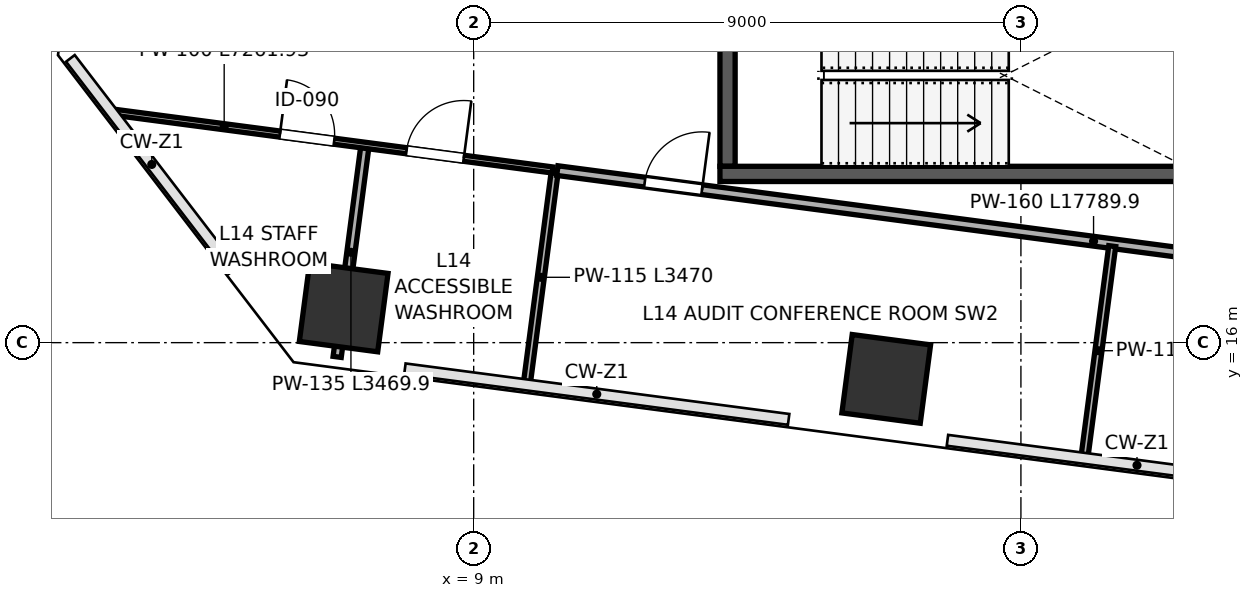
"""IFC4 building model, lengths in metres.
Left out: names, types, materials, properties, quantities, classifications, styles, units other than length and angle.
Written with IfcOpenShell. Run it as: python <this file> out.ifc"""

import sys

from ifc_helpers import new_model, si_unit, direction, frame, frame_2d, origin, origin_2d, place, context, subcontext, project, spatial, rectangle, extrude, clip, halfspace, source, transform, mapped, element, fill, save


model = new_model("IFC4")
c1 = context("Model", 3, precision=1e-05, world=origin(), true_north=direction((0.0, 1.0)))
c2 = subcontext(c1, "Body", "Model", "MODEL_VIEW")
j1 = project(units=[si_unit("LENGTHUNIT", "METRE"), si_unit("PLANEANGLEUNIT", "RADIAN")], contexts=[c1])
p1 = place(None, origin())
s1 = spatial("IfcSite", under=j1, at=p1, CompositionType="ELEMENT")
p2 = place(p1, origin())
s2 = spatial("IfcBuilding", under=s1, at=p2, CompositionType="ELEMENT")
p3 = place(p2, frame((0.0, 0.0, 66.4)))
s3 = spatial("IfcBuildingStorey", under=s2, at=p3, CompositionType="ELEMENT", Elevation=66.4)
p4 = place(p3, frame((6.862, 16.579, 0.0), z_axis=(-0.078747233603, 0.076436236285, 0.993959946367), x_axis=(0.783634981143, 0.621056380729, 0.014324394768)))
e1 = element("IfcColumn", 1, at=p4, inside=s3, PredefinedType="COLUMN", context=c2, shape_type="Clipping", body=[
    clip(clip(extrude(rectangle(XDim=1.3, YDim=1.3, at=origin_2d()), origin(), (0.0, 0.0, 1.0), 4.226), halfspace(frame((0.0, 0.0, 0.081), z_axis=(0.0, 0.0, -1.0), x_axis=(1.0, 0.0, 0.0)), False)), halfspace(frame((0.0, 0.0, 4.145), z_axis=(0.0, 0.0, 1.0), x_axis=(1.0, 0.0, 0.0)), False)),
])
p5 = place(p3, frame((15.785, 15.404, 0.0), z_axis=(-0.085497665031, 0.030505937354, 0.995871245222), x_axis=(0.455606220414, 0.890102566246, 0.011848775584)))
e2 = element("IfcColumn", 2, at=p5, inside=s3, PredefinedType="COLUMN", context=c2, shape_type="Clipping", body=[
    clip(clip(extrude(rectangle(XDim=1.3, YDim=1.3, at=origin_2d()), origin(), (0.0, 0.0, 1.0), 4.218), halfspace(frame((0.0, 0.0, 0.067), z_axis=(0.0, 0.0, -1.0), x_axis=(1.0, 0.0, 0.0)), False)), halfspace(frame((0.0, 0.0, 4.15), z_axis=(0.0, 0.0, 1.0), x_axis=(1.0, 0.0, 0.0)), False)),
])
p6 = place(p3, frame((13.175, 18.9, 0.0), z_axis=(0.0, 0.0, 1.0), x_axis=(0.0, 1.0, 0.0)))
e3 = element("IfcWall", 3, at=p6, inside=s3, PredefinedType="SHEAR", context=c2, shape_type="SweptSolid", body=[
    extrude(rectangle(XDim=2.99, YDim=0.25, at=frame_2d((1.495, 0.0))), origin(), (0.0, 0.0, 1.0), 3.96),
])
p7 = place(p3, frame((13.05, 18.775, 0.0), z_axis=(0.0, 0.0, 1.0), x_axis=(1.0, 0.0, 0.0)))
e4 = element("IfcWall", 4, at=p7, inside=s3, PredefinedType="SHEAR", context=c2, shape_type="SweptSolid", body=[
    extrude(rectangle(XDim=7.9, YDim=0.25, at=frame_2d((3.95, 0.0))), origin(), (0.0, 0.0, 1.0), 3.96),
])
p8 = place(p3, frame((6.755, 15.766, 0.0), z_axis=(0.0, 0.0, 1.0), x_axis=(0.130518214887, 0.991445911577, 0.0)))
e5 = element("IfcWall", 5, at=p8, inside=s3, PredefinedType="PARTITIONING", context=c2, shape_type="SweptSolid", body=[
    extrude(rectangle(XDim=3.47, YDim=0.135, at=frame_2d((1.735, 0.0))), origin(), (0.0, 0.0, 1.0), 3.095),
])
p9 = place(p3, frame((9.878, 15.354, 0.0), z_axis=(0.0, 0.0, 1.0), x_axis=(0.130509110781, 0.991447110038, 0.0)))
e6 = element("IfcWall", 6, at=p9, inside=s3, PredefinedType="PARTITIONING", context=c2, shape_type="SweptSolid", body=[
    extrude(rectangle(XDim=3.47, YDim=0.115, at=frame_2d((1.735, 0.0))), origin(), (0.0, 0.0, 1.0), 3.095),
])
p10 = place(p3, frame((3.097, 19.788, 0.0), z_axis=(0.0, 0.0, 1.0), x_axis=(0.99144674145, -0.130511910828, 0.0)))
e7 = element("IfcWall", 7, at=p10, inside=s3, PredefinedType="PARTITIONING", context=c2, shape_type="SweptSolid", body=[
    extrude(rectangle(XDim=7.262, YDim=0.1, at=frame_2d((3.631, 0.0))), origin(), (0.0, 0.0, 1.0), 3.96),
])
p11 = place(p10, frame((2.74, 0.0, 0.0)))
e8 = element("IfcOpeningElement", 8, at=p11, cuts=e7, PredefinedType="OPENING", context=c2, shape_type="SweptSolid", body=[
    extrude(rectangle(XDim=0.9, YDim=2.15, at=frame_2d((0.45, 1.075))), frame((0.0, 0.06, 0.0), z_axis=(0.0, -1.0, 0.0), x_axis=(1.0, 0.0, 0.0)), (0.0, 0.0, 1.0), 0.12),
])
p12 = place(p10, frame((4.84, 0.0, 0.0)))
e9 = element("IfcOpeningElement", 9, at=p12, cuts=e7, PredefinedType="OPENING", context=c2, shape_type="SweptSolid", body=[
    extrude(rectangle(XDim=0.95, YDim=2.15, at=frame_2d((0.475, 1.075))), frame((0.0, 0.06, 0.0), z_axis=(0.0, -1.0, 0.0), x_axis=(1.0, 0.0, 0.0)), (0.0, 0.0, 1.0), 0.12),
])
p13 = place(p3, frame((10.376, 18.829, 0.0), z_axis=(0.0, 0.0, 1.0), x_axis=(0.99144504436, -0.130524802294, 0.0)))
e10 = element("IfcWall", 10, at=p13, inside=s3, PredefinedType="PARTITIONING", context=c2, shape_type="SweptSolid", body=[
    extrude(rectangle(XDim=17.79, YDim=0.16, at=frame_2d((8.895, 0.0))), origin(), (0.0, 0.0, 1.0), 3.96),
])
p14 = place(p13, frame((1.45, 0.0, 0.0)))
e11 = element("IfcOpeningElement", 11, at=p14, cuts=e10, PredefinedType="OPENING", context=c2, shape_type="SweptSolid", body=[
    extrude(rectangle(XDim=0.95, YDim=2.15, at=frame_2d((0.475, 1.075))), frame((0.0, 0.09, 0.0), z_axis=(0.0, -1.0, 0.0), x_axis=(1.0, 0.0, 0.0)), (0.0, 0.0, 1.0), 0.18),
])
p15 = place(p13, frame((10.5, 0.0, 0.0)))
e12 = element("IfcOpeningElement", 12, at=p15, cuts=e10, PredefinedType="OPENING", context=c2, shape_type="SweptSolid", body=[
    extrude(rectangle(XDim=0.95, YDim=2.15, at=frame_2d((0.475, 1.075))), frame((0.0, 0.09, 0.0), z_axis=(0.0, -1.0, 0.0), x_axis=(1.0, 0.0, 0.0)), (0.0, 0.0, 1.0), 0.18),
])
p16 = place(p3, frame((19.049, 14.147, 0.0), z_axis=(0.0, 0.0, 1.0), x_axis=(0.130518214887, 0.991445911577, 0.0)))
e13 = element("IfcWall", 13, at=p16, inside=s3, PredefinedType="PARTITIONING", context=c2, shape_type="SweptSolid", body=[
    extrude(rectangle(XDim=3.47, YDim=0.115, at=frame_2d((1.735, 0.0))), origin(), (0.0, 0.0, 1.0), 3.095),
])
m1 = source(origin(), c2, "Body", "SweptSolid", [
    extrude(rectangle(XDim=0.9, YDim=2.15, at=frame_2d((0.45, 1.075))), frame((0.0, 0.025, 0.0), z_axis=(0.0, -1.0, 0.0), x_axis=(1.0, 0.0, 0.0)), (0.0, 0.0, 1.0), 0.05),
])
p17 = place(p11, origin())
e14 = element("IfcDoor", 14, at=p17, inside=s3, OperationType="SINGLE_SWING_LEFT", PredefinedType="DOOR", context=c2, shape_type="MappedRepresentation", body=[
    mapped(m1, transform((0.0, 0.0, 0.0), scale=1.0)),
])
fill(e8, e14)
m2 = source(origin(), c2, "Body", "SweptSolid", [
    extrude(rectangle(XDim=0.95, YDim=2.15, at=frame_2d((0.475, 1.075))), frame((0.0, 0.025, 0.0), z_axis=(0.0, -1.0, 0.0), x_axis=(1.0, 0.0, 0.0)), (0.0, 0.0, 1.0), 0.05),
])
p18 = place(p12, origin())
e15 = element("IfcDoor", 15, at=p18, inside=s3, OperationType="SINGLE_SWING_RIGHT", PredefinedType="DOOR", context=c2, shape_type="MappedRepresentation", body=[
    mapped(m2, transform((0.0, 0.0, 0.0), scale=1.0)),
])
fill(e9, e15)
m3 = source(origin(), c2, "Body", "SweptSolid", [
    extrude(rectangle(XDim=0.95, YDim=2.15, at=frame_2d((0.475, 1.075))), frame((0.0, 0.025, 0.0), z_axis=(0.0, -1.0, 0.0), x_axis=(1.0, 0.0, 0.0)), (0.0, 0.0, 1.0), 0.05),
])
p19 = place(p14, origin())
e16 = element("IfcDoor", 16, at=p19, inside=s3, OperationType="SINGLE_SWING_RIGHT", PredefinedType="DOOR", context=c2, shape_type="MappedRepresentation", body=[
    mapped(m3, transform((0.0, 0.0, 0.0), scale=1.0)),
])
fill(e11, e16)
save(model, sys.argv[1])
